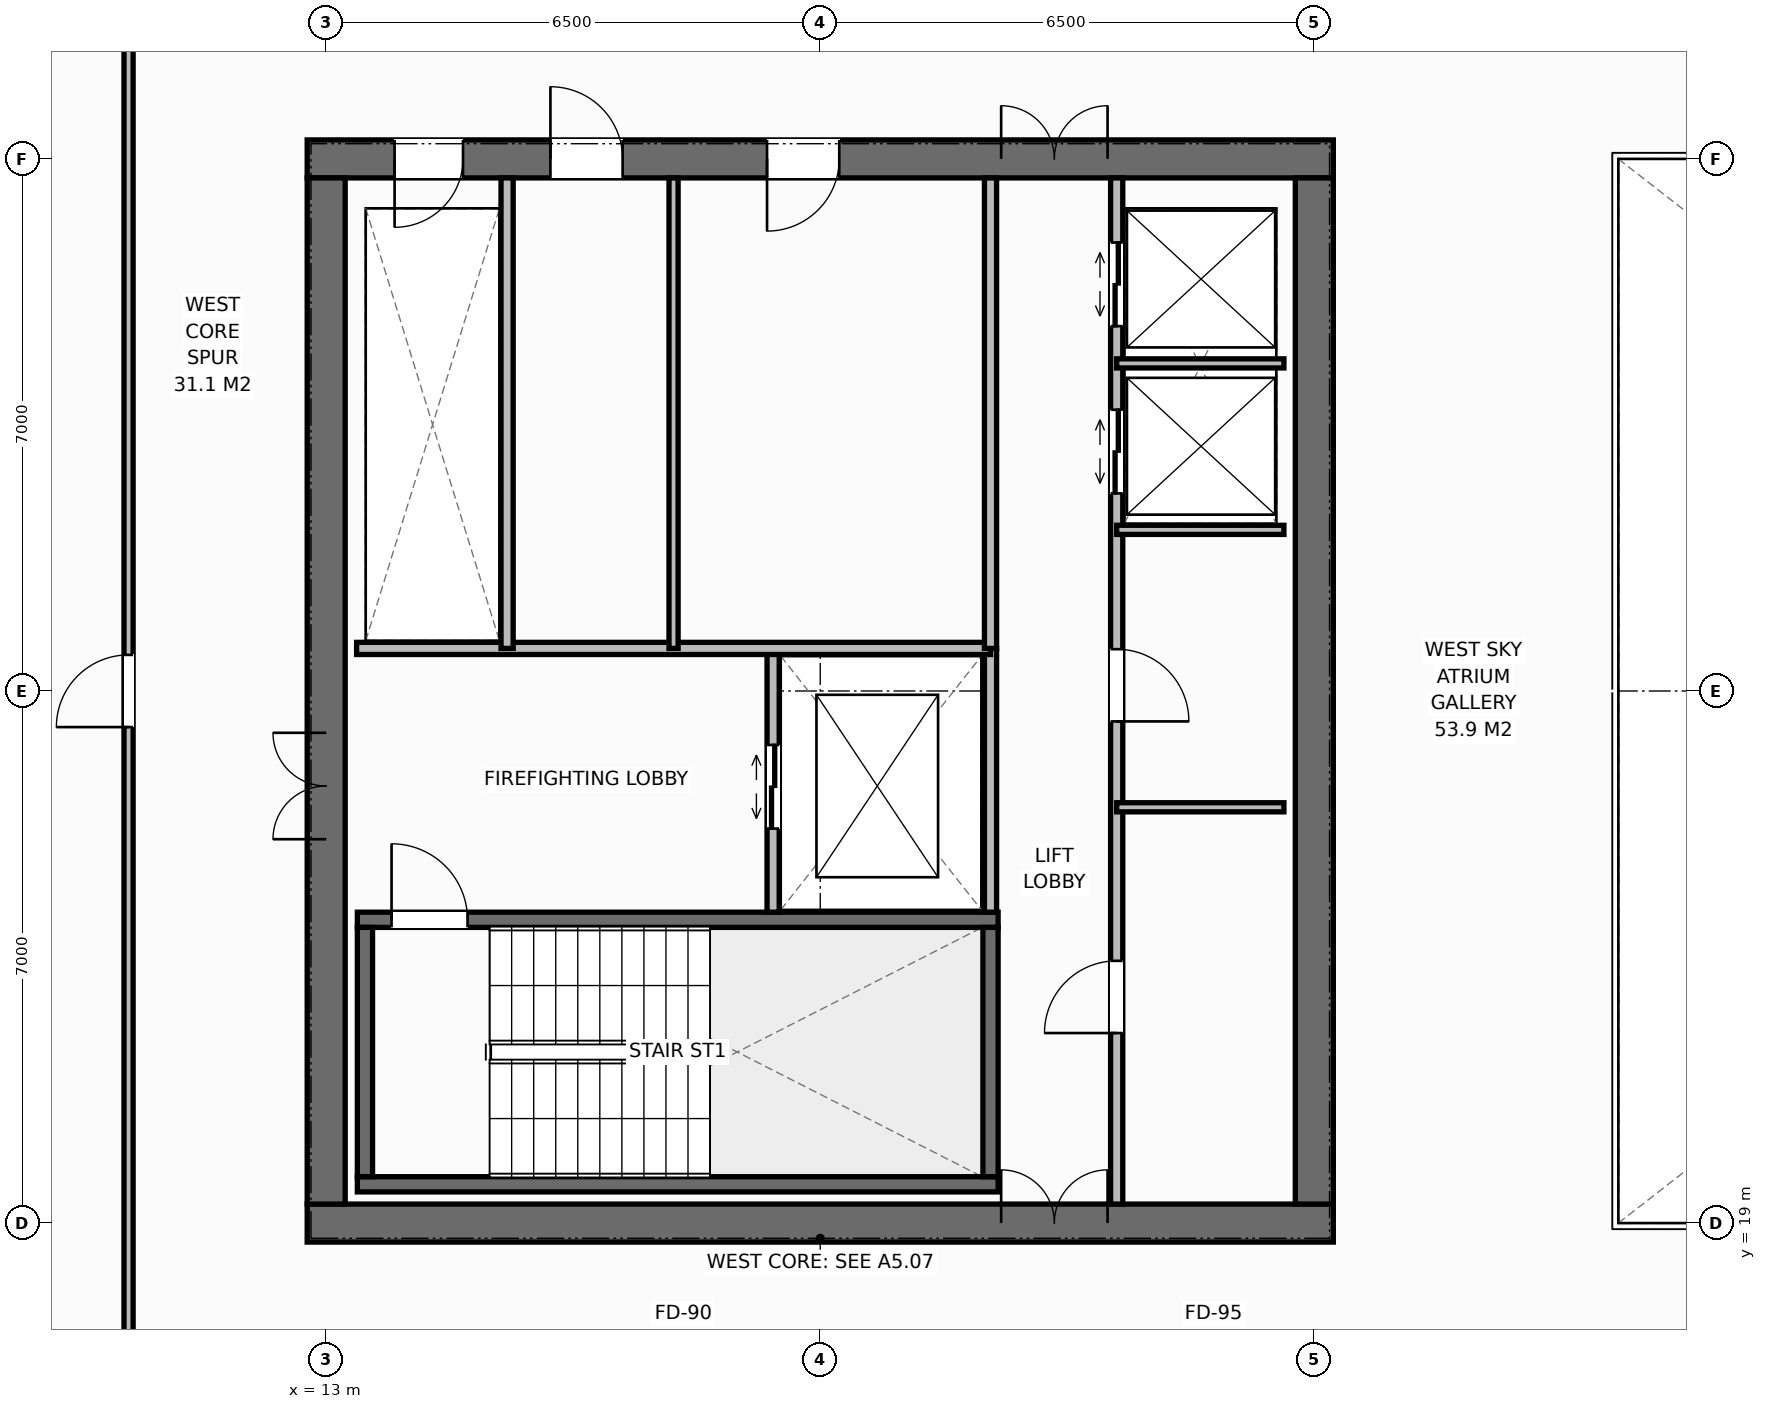
"""IFC4 building model, lengths in metres.
Left out: names, types, materials, properties, quantities, classifications, styles, units other than length and angle.
Written with IfcOpenShell. Run it as: python <this file> out.ifc"""

import sys

from ifc_helpers import new_model, si_unit, direction, frame, frame_2d, origin, place, context, subcontext, project, spatial, rectangle, extrude, element, fill, save


model = new_model("IFC4")
c1 = context("Model", 3, precision=1e-05, world=origin(), true_north=direction((0.0, 1.0)))
c2 = subcontext(c1, "Body", "Model", "MODEL_VIEW")
j1 = project(units=[si_unit("LENGTHUNIT", "METRE"), si_unit("PLANEANGLEUNIT", "RADIAN")], contexts=[c1])
p1 = place(None, origin())
s1 = spatial("IfcSite", under=j1, at=p1, CompositionType="ELEMENT")
p2 = place(p1, origin())
s2 = spatial("IfcBuilding", under=s1, at=p2, CompositionType="ELEMENT")
p3 = place(p2, frame((0.0, 0.0, 244.2)))
s3 = spatial("IfcBuildingStorey", under=s2, at=p3, CompositionType="ELEMENT", Elevation=244.2)
p4 = place(p3, frame((12.75, 19.0, 0.0), z_axis=(0.0, 0.0, 1.0), x_axis=(1.0, 0.0, 0.0)))
e1 = element("IfcWall", 1, at=p4, inside=s3, PredefinedType="SHEAR", context=c2, shape_type="SweptSolid", body=[
    extrude(rectangle(XDim=13.5, YDim=0.5, at=frame_2d((6.75, 0.0))), origin(), (0.0, 0.0, 1.0), 3.8),
])
p5 = place(p4, frame((9.13, 0.0, 0.0)))
e2 = element("IfcOpeningElement", 2, at=p5, cuts=e1, PredefinedType="OPENING", context=c2, shape_type="SweptSolid", body=[
    extrude(rectangle(XDim=1.4, YDim=2.2, at=frame_2d((0.7, 1.1))), frame((0.0, 0.26, 0.0), z_axis=(0.0, -1.0, 0.0), x_axis=(1.0, 0.0, 0.0)), (0.0, 0.0, 1.0), 0.52),
])
p6 = place(p3, frame((12.75, 33.0, 0.0), z_axis=(0.0, 0.0, 1.0), x_axis=(1.0, 0.0, 0.0)))
e3 = element("IfcWall", 3, at=p6, inside=s3, PredefinedType="SHEAR", context=c2, shape_type="SweptSolid", body=[
    extrude(rectangle(XDim=13.5, YDim=0.5, at=frame_2d((6.75, 0.0))), origin(), (0.0, 0.0, 1.0), 3.8),
])
p7 = place(p6, frame((1.15, 0.0, 0.0)))
e4 = element("IfcOpeningElement", 4, at=p7, cuts=e3, PredefinedType="OPENING", context=c2, shape_type="SweptSolid", body=[
    extrude(rectangle(XDim=0.9, YDim=2.15, at=frame_2d((0.45, 1.075))), frame((0.0, 0.26, 0.0), z_axis=(0.0, -1.0, 0.0), x_axis=(1.0, 0.0, 0.0)), (0.0, 0.0, 1.0), 0.52),
])
p8 = place(p6, frame((3.2, 0.0, 0.0)))
e5 = element("IfcOpeningElement", 5, at=p8, cuts=e3, PredefinedType="OPENING", context=c2, shape_type="SweptSolid", body=[
    extrude(rectangle(XDim=0.95, YDim=2.15, at=frame_2d((0.475, 1.075))), frame((0.0, 0.26, 0.0), z_axis=(0.0, -1.0, 0.0), x_axis=(1.0, 0.0, 0.0)), (0.0, 0.0, 1.0), 0.52),
])
p9 = place(p6, frame((6.05, 0.0, 0.0)))
e6 = element("IfcOpeningElement", 6, at=p9, cuts=e3, PredefinedType="OPENING", context=c2, shape_type="SweptSolid", body=[
    extrude(rectangle(XDim=0.95, YDim=2.15, at=frame_2d((0.475, 1.075))), frame((0.0, 0.26, 0.0), z_axis=(0.0, -1.0, 0.0), x_axis=(1.0, 0.0, 0.0)), (0.0, 0.0, 1.0), 0.52),
])
p10 = place(p6, frame((9.13, 0.0, 0.0)))
e7 = element("IfcOpeningElement", 7, at=p10, cuts=e3, PredefinedType="OPENING", context=c2, shape_type="SweptSolid", body=[
    extrude(rectangle(XDim=1.4, YDim=2.2, at=frame_2d((0.7, 1.1))), frame((0.0, 0.26, 0.0), z_axis=(0.0, -1.0, 0.0), x_axis=(1.0, 0.0, 0.0)), (0.0, 0.0, 1.0), 0.52),
])
p11 = place(p3, frame((13.0, 19.25, 0.0), z_axis=(0.0, 0.0, 1.0), x_axis=(0.0, 1.0, 0.0)))
e8 = element("IfcWall", 8, at=p11, inside=s3, PredefinedType="SHEAR", context=c2, shape_type="SweptSolid", body=[
    extrude(rectangle(XDim=13.5, YDim=0.5, at=frame_2d((6.75, 0.0))), origin(), (0.0, 0.0, 1.0), 3.8),
])
p12 = place(p11, frame((4.8, 0.0, 0.0)))
e9 = element("IfcOpeningElement", 9, at=p12, cuts=e8, PredefinedType="OPENING", context=c2, shape_type="SweptSolid", body=[
    extrude(rectangle(XDim=1.4, YDim=2.2, at=frame_2d((0.7, 1.1))), frame((0.0, 0.26, 0.0), z_axis=(0.0, -1.0, 0.0), x_axis=(1.0, 0.0, 0.0)), (0.0, 0.0, 1.0), 0.52),
])
p13 = place(p3, frame((26.0, 19.25, 0.0), z_axis=(0.0, 0.0, 1.0), x_axis=(0.0, 1.0, 0.0)))
e10 = element("IfcWall", 10, at=p13, inside=s3, PredefinedType="SHEAR", context=c2, shape_type="SweptSolid", body=[
    extrude(rectangle(XDim=13.5, YDim=0.5, at=frame_2d((6.75, 0.0))), origin(), (0.0, 0.0, 1.0), 3.8),
])
p14 = place(p3, frame((13.41, 19.51, 0.0), z_axis=(0.0, 0.0, 1.0), x_axis=(1.0, 0.0, 0.0)))
e11 = element("IfcWall", 11, at=p14, inside=s3, PredefinedType="SHEAR", context=c2, shape_type="SweptSolid", body=[
    extrude(rectangle(XDim=8.43, YDim=0.2, at=frame_2d((4.215, 0.0))), origin(), (0.0, 0.0, 1.0), 3.8),
])
p15 = place(p3, frame((13.41, 22.99, 0.0), z_axis=(0.0, 0.0, 1.0), x_axis=(1.0, 0.0, 0.0)))
e12 = element("IfcWall", 12, at=p15, inside=s3, PredefinedType="SHEAR", context=c2, shape_type="SweptSolid", body=[
    extrude(rectangle(XDim=8.43, YDim=0.2, at=frame_2d((4.215, 0.0))), origin(), (0.0, 0.0, 1.0), 3.8),
])
p16 = place(p15, frame((0.45, 0.0, 0.0)))
e13 = element("IfcOpeningElement", 13, at=p16, cuts=e12, PredefinedType="OPENING", context=c2, shape_type="SweptSolid", body=[
    extrude(rectangle(XDim=1.0, YDim=2.15, at=frame_2d((0.5, 1.075))), frame((0.0, 0.11, 0.0), z_axis=(0.0, -1.0, 0.0), x_axis=(1.0, 0.0, 0.0)), (0.0, 0.0, 1.0), 0.22),
])
for number, where, z_axis, x_axis in (
    (14, (13.51, 19.61, 0.0), (0.0, 0.0, 1.0), (0.0, 1.0, 0.0)),
    (15, (21.74, 19.61, 0.0), (0.0, 0.0, 1.0), (0.0, 1.0, 0.0)),
):
    element("IfcWall", number, at=place(p3, frame(where, z_axis=z_axis, x_axis=x_axis)), inside=s3, PredefinedType="SHEAR", context=c2, shape_type="SweptSolid", body=[
        extrude(rectangle(XDim=3.28, YDim=0.2, at=frame_2d((1.64, 0.0))), origin(), (0.0, 0.0, 1.0), 3.8),
    ])
p17 = place(p3, frame((21.74, 23.09, 0.0), z_axis=(0.0, 0.0, 1.0), x_axis=(0.0, 1.0, 0.0)))
e16 = element("IfcWall", 16, at=p17, inside=s3, PredefinedType="STANDARD", context=c2, shape_type="SweptSolid", body=[
    extrude(rectangle(XDim=3.47, YDim=0.16, at=frame_2d((1.735, 0.0))), origin(), (0.0, 0.0, 1.0), 3.58),
])
p18 = place(p3, frame((18.88, 23.09, 0.0), z_axis=(0.0, 0.0, 1.0), x_axis=(0.0, 1.0, 0.0)))
e17 = element("IfcWall", 17, at=p18, inside=s3, PredefinedType="STANDARD", context=c2, shape_type="SweptSolid", body=[
    extrude(rectangle(XDim=3.47, YDim=0.16, at=frame_2d((1.735, 0.0))), origin(), (0.0, 0.0, 1.0), 3.58),
])
p19 = place(p18, frame((1.1, 0.0, 0.0)))
e18 = element("IfcOpeningElement", 18, at=p19, cuts=e17, PredefinedType="OPENING", context=c2, shape_type="SweptSolid", body=[
    extrude(rectangle(XDim=1.1, YDim=2.2, at=frame_2d((0.55, 1.1))), frame((0.0, 0.09, 0.0), z_axis=(0.0, -1.0, 0.0), x_axis=(1.0, 0.0, 0.0)), (0.0, 0.0, 1.0), 0.18),
])
p20 = place(p3, frame((13.4, 26.56, 0.0), z_axis=(0.0, 0.0, 1.0), x_axis=(1.0, 0.0, 0.0)))
e19 = element("IfcWall", 19, at=p20, inside=s3, PredefinedType="STANDARD", context=c2, shape_type="SweptSolid", body=[
    extrude(rectangle(XDim=8.34, YDim=0.16, at=frame_2d((4.17, 0.0))), origin(), (0.0, 0.0, 1.0), 3.58),
])
p21 = place(p3, frame((15.38, 26.56, 0.0), z_axis=(0.0, 0.0, 1.0), x_axis=(0.0, 1.0, 0.0)))
e20 = element("IfcWall", 20, at=p21, inside=s3, PredefinedType="STANDARD", context=c2, shape_type="SweptSolid", body=[
    extrude(rectangle(XDim=6.19, YDim=0.16, at=frame_2d((3.095, 0.0))), origin(), (0.0, 0.0, 1.0), 3.58),
])
p22 = place(p3, frame((17.57, 26.56, 0.0), z_axis=(0.0, 0.0, 1.0), x_axis=(0.0, 1.0, 0.0)))
e21 = element("IfcWall", 21, at=p22, inside=s3, PredefinedType="PARTITIONING", context=c2, shape_type="SweptSolid", body=[
    extrude(rectangle(XDim=6.19, YDim=0.12, at=frame_2d((3.095, 0.0))), origin(), (0.0, 0.0, 1.0), 3.58),
])
p23 = place(p3, frame((21.74, 26.56, 0.0), z_axis=(0.0, 0.0, 1.0), x_axis=(0.0, 1.0, 0.0)))
e22 = element("IfcWall", 22, at=p23, inside=s3, PredefinedType="STANDARD", context=c2, shape_type="SweptSolid", body=[
    extrude(rectangle(XDim=6.19, YDim=0.16, at=frame_2d((3.095, 0.0))), origin(), (0.0, 0.0, 1.0), 3.58),
])
p24 = place(p3, frame((23.4, 19.25, 0.0), z_axis=(0.0, 0.0, 1.0), x_axis=(0.0, 1.0, 0.0)))
e23 = element("IfcWall", 23, at=p24, inside=s3, PredefinedType="STANDARD", context=c2, shape_type="SweptSolid", body=[
    extrude(rectangle(XDim=13.5, YDim=0.16, at=frame_2d((6.75, 0.0))), origin(), (0.0, 0.0, 1.0), 3.58),
])
p25 = place(p24, frame((2.25, 0.0, 0.0)))
e24 = element("IfcOpeningElement", 24, at=p25, cuts=e23, PredefinedType="OPENING", context=c2, shape_type="SweptSolid", body=[
    extrude(rectangle(XDim=0.95, YDim=2.15, at=frame_2d((0.475, 1.075))), frame((0.0, 0.09, 0.0), z_axis=(0.0, -1.0, 0.0), x_axis=(1.0, 0.0, 0.0)), (0.0, 0.0, 1.0), 0.18),
])
p26 = place(p24, frame((6.35, 0.0, 0.0)))
e25 = element("IfcOpeningElement", 25, at=p26, cuts=e23, PredefinedType="OPENING", context=c2, shape_type="SweptSolid", body=[
    extrude(rectangle(XDim=0.95, YDim=2.15, at=frame_2d((0.475, 1.075))), frame((0.0, 0.09, 0.0), z_axis=(0.0, -1.0, 0.0), x_axis=(1.0, 0.0, 0.0)), (0.0, 0.0, 1.0), 0.18),
])
p27 = place(p24, frame((9.35, 0.0, 0.0)))
e26 = element("IfcOpeningElement", 26, at=p27, cuts=e23, PredefinedType="OPENING", context=c2, shape_type="SweptSolid", body=[
    extrude(rectangle(XDim=1.1, YDim=2.2, at=frame_2d((0.55, 1.1))), frame((0.0, 0.09, 0.0), z_axis=(0.0, -1.0, 0.0), x_axis=(1.0, 0.0, 0.0)), (0.0, 0.0, 1.0), 0.18),
])
p28 = place(p24, frame((11.55, 0.0, 0.0)))
e27 = element("IfcOpeningElement", 27, at=p28, cuts=e23, PredefinedType="OPENING", context=c2, shape_type="SweptSolid", body=[
    extrude(rectangle(XDim=1.1, YDim=2.2, at=frame_2d((0.55, 1.1))), frame((0.0, 0.09, 0.0), z_axis=(0.0, -1.0, 0.0), x_axis=(1.0, 0.0, 0.0)), (0.0, 0.0, 1.0), 0.18),
])
for number, where, z_axis, x_axis in (
    (28, (23.4, 24.47, 0.0), (0.0, 0.0, 1.0), (1.0, 0.0, 0.0)),
    (29, (23.4, 28.12, 0.0), (0.0, 0.0, 1.0), (1.0, 0.0, 0.0)),
    (30, (23.4, 30.31, 0.0), (0.0, 0.0, 1.0), (1.0, 0.0, 0.0)),
):
    element("IfcWall", number, at=place(p3, frame(where, z_axis=z_axis, x_axis=x_axis)), inside=s3, PredefinedType="PARTITIONING", context=c2, shape_type="SweptSolid", body=[
        extrude(rectangle(XDim=2.2, YDim=0.12, at=frame_2d((1.1, 0.0))), origin(), (0.0, 0.0, 1.0), 3.58),
    ])
p29 = place(p3, frame((10.4, 16.5, 0.0), z_axis=(0.0, 0.0, 1.0), x_axis=(0.0, 1.0, 0.0)))
e31 = element("IfcWall", 31, at=p29, inside=s3, PredefinedType="PARTITIONING", context=c2, shape_type="SweptSolid", body=[
    extrude(rectangle(XDim=19.0, YDim=0.12, at=frame_2d((9.5, 0.0))), origin(), (0.0, 0.0, 1.0), 3.58),
])
p30 = place(p29, frame((9.025, 0.0, 0.0)))
e32 = element("IfcOpeningElement", 32, at=p30, cuts=e31, PredefinedType="OPENING", context=c2, shape_type="SweptSolid", body=[
    extrude(rectangle(XDim=0.95, YDim=2.15, at=frame_2d((0.475, 1.075))), frame((0.0, 0.07, 0.0), z_axis=(0.0, -1.0, 0.0), x_axis=(1.0, 0.0, 0.0)), (0.0, 0.0, 1.0), 0.14),
])
p31 = place(p16, origin())
e33 = element("IfcDoor", 33, at=p31, inside=s3, OperationType="SINGLE_SWING_LEFT", PredefinedType="DOOR", context=c2, shape_type="SweptSolid", body=[
    extrude(rectangle(XDim=1.0, YDim=2.15, at=frame_2d((0.5, 1.075))), frame((0.0, 0.025, 0.0), z_axis=(0.0, -1.0, 0.0), x_axis=(1.0, 0.0, 0.0)), (0.0, 0.0, 1.0), 0.05),
])
fill(e13, e33)
p32 = place(p12, origin())
e34 = element("IfcDoor", 34, at=p32, inside=s3, OperationType="DOUBLE_DOOR_SINGLE_SWING", PredefinedType="DOOR", context=c2, shape_type="SweptSolid", body=[
    extrude(rectangle(XDim=1.4, YDim=2.2, at=frame_2d((0.7, 1.1))), frame((0.0, 0.025, 0.0), z_axis=(0.0, -1.0, 0.0), x_axis=(1.0, 0.0, 0.0)), (0.0, 0.0, 1.0), 0.05),
])
fill(e9, e34)
p33 = place(p19, origin())
e35 = element("IfcDoor", 35, at=p33, inside=s3, OperationType="DOUBLE_DOOR_SLIDING", PredefinedType="DOOR", context=c2, shape_type="SweptSolid", body=[
    extrude(rectangle(XDim=1.1, YDim=2.2, at=frame_2d((0.55, 1.1))), frame((0.0, 0.025, 0.0), z_axis=(0.0, -1.0, 0.0), x_axis=(1.0, 0.0, 0.0)), (0.0, 0.0, 1.0), 0.05),
])
fill(e18, e35)
p34 = place(p7, origin())
e36 = element("IfcDoor", 36, at=p34, inside=s3, OperationType="SINGLE_SWING_RIGHT", PredefinedType="DOOR", context=c2, shape_type="SweptSolid", body=[
    extrude(rectangle(XDim=0.9, YDim=2.15, at=frame_2d((0.45, 1.075))), frame((0.0, -0.025, 0.0), z_axis=(0.0, -1.0, 0.0), x_axis=(1.0, 0.0, 0.0)), (0.0, 0.0, 1.0), 0.05),
])
fill(e4, e36)
p35 = place(p8, origin())
e37 = element("IfcDoor", 37, at=p35, inside=s3, OperationType="SINGLE_SWING_LEFT", PredefinedType="DOOR", context=c2, shape_type="SweptSolid", body=[
    extrude(rectangle(XDim=0.95, YDim=2.15, at=frame_2d((0.475, 1.075))), frame((0.0, -0.025, 0.0), z_axis=(0.0, -1.0, 0.0), x_axis=(1.0, 0.0, 0.0)), (0.0, 0.0, 1.0), 0.05),
])
fill(e5, e37)
p36 = place(p9, origin())
e38 = element("IfcDoor", 38, at=p36, inside=s3, OperationType="SINGLE_SWING_RIGHT", PredefinedType="DOOR", context=c2, shape_type="SweptSolid", body=[
    extrude(rectangle(XDim=0.95, YDim=2.15, at=frame_2d((0.475, 1.075))), frame((0.0, -0.025, 0.0), z_axis=(0.0, -1.0, 0.0), x_axis=(1.0, 0.0, 0.0)), (0.0, 0.0, 1.0), 0.05),
])
fill(e6, e38)
p37 = place(p5, origin())
e39 = element("IfcDoor", 39, at=p37, inside=s3, OperationType="DOUBLE_DOOR_SINGLE_SWING", PredefinedType="DOOR", context=c2, shape_type="SweptSolid", body=[
    extrude(rectangle(XDim=1.4, YDim=2.2, at=frame_2d((0.7, 1.1))), frame((0.0, 0.075, 0.0), z_axis=(0.0, -1.0, 0.0), x_axis=(1.0, 0.0, 0.0)), (0.0, 0.0, 1.0), 0.05),
])
fill(e2, e39)
p38 = place(p10, origin())
e40 = element("IfcDoor", 40, at=p38, inside=s3, OperationType="DOUBLE_DOOR_SINGLE_SWING", PredefinedType="DOOR", context=c2, shape_type="SweptSolid", body=[
    extrude(rectangle(XDim=1.4, YDim=2.2, at=frame_2d((0.7, 1.1))), frame((0.0, -0.025, 0.0), z_axis=(0.0, -1.0, 0.0), x_axis=(1.0, 0.0, 0.0)), (0.0, 0.0, 1.0), 0.05),
])
fill(e7, e40)
p39 = place(p25, origin())
e41 = element("IfcDoor", 41, at=p39, inside=s3, OperationType="SINGLE_SWING_LEFT", PredefinedType="DOOR", context=c2, shape_type="SweptSolid", body=[
    extrude(rectangle(XDim=0.95, YDim=2.15, at=frame_2d((0.475, 1.075))), frame((0.0, 0.025, 0.0), z_axis=(0.0, -1.0, 0.0), x_axis=(1.0, 0.0, 0.0)), (0.0, 0.0, 1.0), 0.05),
])
fill(e24, e41)
p40 = place(p26, origin())
e42 = element("IfcDoor", 42, at=p40, inside=s3, OperationType="SINGLE_SWING_RIGHT", PredefinedType="DOOR", context=c2, shape_type="SweptSolid", body=[
    extrude(rectangle(XDim=0.95, YDim=2.15, at=frame_2d((0.475, 1.075))), frame((0.0, 0.025, 0.0), z_axis=(0.0, -1.0, 0.0), x_axis=(1.0, 0.0, 0.0)), (0.0, 0.0, 1.0), 0.05),
])
fill(e25, e42)
p41 = place(p27, origin())
e43 = element("IfcDoor", 43, at=p41, inside=s3, OperationType="DOUBLE_DOOR_SLIDING", PredefinedType="DOOR", context=c2, shape_type="SweptSolid", body=[
    extrude(rectangle(XDim=1.1, YDim=2.2, at=frame_2d((0.55, 1.1))), frame((0.0, 0.025, 0.0), z_axis=(0.0, -1.0, 0.0), x_axis=(1.0, 0.0, 0.0)), (0.0, 0.0, 1.0), 0.05),
])
fill(e26, e43)
p42 = place(p28, origin())
e44 = element("IfcDoor", 44, at=p42, inside=s3, OperationType="DOUBLE_DOOR_SLIDING", PredefinedType="DOOR", context=c2, shape_type="SweptSolid", body=[
    extrude(rectangle(XDim=1.1, YDim=2.2, at=frame_2d((0.55, 1.1))), frame((0.0, 0.025, 0.0), z_axis=(0.0, -1.0, 0.0), x_axis=(1.0, 0.0, 0.0)), (0.0, 0.0, 1.0), 0.05),
])
fill(e27, e44)
p43 = place(p30, origin())
e45 = element("IfcDoor", 45, at=p43, inside=s3, OperationType="SINGLE_SWING_LEFT", PredefinedType="DOOR", context=c2, shape_type="SweptSolid", body=[
    extrude(rectangle(XDim=0.95, YDim=2.15, at=frame_2d((0.475, 1.075))), frame((0.0, 0.025, 0.0), z_axis=(0.0, -1.0, 0.0), x_axis=(1.0, 0.0, 0.0)), (0.0, 0.0, 1.0), 0.05),
])
fill(e32, e45)
save(model, sys.argv[1])
